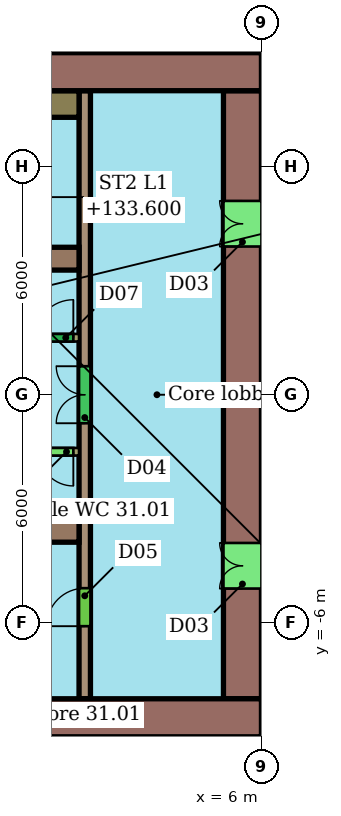
"""IFC4 building model, lengths in metres.
Left out: names, types, materials, properties, quantities, classifications, styles, units other than length and angle.
Written with IfcOpenShell. Run it as: python <this file> out.ifc"""

import sys

from ifc_helpers import new_model, si_unit, direction, frame, frame_2d, origin, place, context, subcontext, project, spatial, rectangle, extrude, element, fill, save


model = new_model("IFC4")
c1 = context("Model", 3, precision=1e-05, world=origin(), true_north=direction((0.0, 1.0)))
c2 = subcontext(c1, "Body", "Model", "MODEL_VIEW")
j1 = project(units=[si_unit("LENGTHUNIT", "METRE"), si_unit("PLANEANGLEUNIT", "RADIAN")], contexts=[c1])
p1 = place(None, origin())
s1 = spatial("IfcSite", under=j1, at=p1, CompositionType="ELEMENT")
p2 = place(p1, origin())
s2 = spatial("IfcBuilding", under=s1, at=p2, CompositionType="ELEMENT")
p3 = place(p2, frame((0.0, 0.0, 131.8)))
s3 = spatial("IfcBuildingStorey", under=s2, at=p3, CompositionType="ELEMENT", Elevation=131.8)
p4 = place(p3, frame((6.0, 8.5, 0.0), z_axis=(0.0, 0.0, 1.0), x_axis=(-1.0, 0.0, 0.0)))
e1 = element("IfcWall", 1, at=p4, inside=s3, PredefinedType="SHEAR", context=c2, shape_type="SweptSolid", body=[
    extrude(rectangle(XDim=12.0, YDim=1.0, at=frame_2d((6.0, 0.0))), origin(), (0.0, 0.0, 1.0), 3.3),
])
p5 = place(p4, frame((5.6, 0.0, 0.0)))
e2 = element("IfcOpeningElement", 2, at=p5, cuts=e1, PredefinedType="OPENING", context=c2, shape_type="SweptSolid", body=[
    extrude(rectangle(XDim=1.2, YDim=2.1, at=frame_2d((0.6, 1.05))), frame((0.0, 0.51, 0.0), z_axis=(0.0, -1.0, 0.0), x_axis=(1.0, 0.0, 0.0)), (0.0, 0.0, 1.0), 1.02),
])
p6 = place(p3, frame((-18.0, -8.5, 0.0), z_axis=(0.0, 0.0, 1.0), x_axis=(1.0, 0.0, 0.0)))
e3 = element("IfcWall", 3, at=p6, inside=s3, PredefinedType="SHEAR", context=c2, shape_type="SweptSolid", body=[
    extrude(rectangle(XDim=24.0, YDim=1.0, at=frame_2d((12.0, 0.0))), origin(), (0.0, 0.0, 1.0), 3.3),
])
p7 = place(p6, frame((6.0, 0.0, 0.0)))
e4 = element("IfcOpeningElement", 4, at=p7, cuts=e3, PredefinedType="OPENING", context=c2, shape_type="SweptSolid", body=[
    extrude(rectangle(XDim=1.2, YDim=2.1, at=frame_2d((0.6, 1.05))), frame((0.0, 0.51, 0.0), z_axis=(0.0, -1.0, 0.0), x_axis=(1.0, 0.0, 0.0)), (0.0, 0.0, 1.0), 1.02),
])
p8 = place(p3, frame((5.5, -8.0, 0.0), z_axis=(0.0, 0.0, 1.0), x_axis=(0.0, 1.0, 0.0)))
e5 = element("IfcWall", 5, at=p8, inside=s3, PredefinedType="SHEAR", context=c2, shape_type="SweptSolid", body=[
    extrude(rectangle(XDim=16.0, YDim=1.0, at=frame_2d((8.0, 0.0))), origin(), (0.0, 0.0, 1.0), 3.3),
])
p9 = place(p8, frame((2.9, 0.0, 0.0)))
e6 = element("IfcOpeningElement", 6, at=p9, cuts=e5, PredefinedType="OPENING", context=c2, shape_type="SweptSolid", body=[
    extrude(rectangle(XDim=1.2, YDim=2.1, at=frame_2d((0.6, 1.05))), frame((0.0, 0.51, 0.0), z_axis=(0.0, -1.0, 0.0), x_axis=(1.0, 0.0, 0.0)), (0.0, 0.0, 1.0), 1.02),
])
p10 = place(p8, frame((11.9, 0.0, 0.0)))
e7 = element("IfcOpeningElement", 7, at=p10, cuts=e5, PredefinedType="OPENING", context=c2, shape_type="SweptSolid", body=[
    extrude(rectangle(XDim=1.2, YDim=2.1, at=frame_2d((0.6, 1.05))), frame((0.0, 0.51, 0.0), z_axis=(0.0, -1.0, 0.0), x_axis=(1.0, 0.0, 0.0)), (0.0, 0.0, 1.0), 1.02),
])
for number, where, z_axis, x_axis in (
    (8, (-6.0, 3.58, 0.0), (0.0, 0.0, 1.0), (1.0, 0.0, 0.0)),
    (9, (-6.0, -3.58, 0.0), (0.0, 0.0, 1.0), (1.0, 0.0, 0.0)),
):
    element("IfcWall", number, at=place(p3, frame(where, z_axis=z_axis, x_axis=x_axis)), inside=s3, PredefinedType="SHEAR", context=c2, shape_type="SweptSolid", body=[
        extrude(rectangle(XDim=7.2, YDim=0.6, at=frame_2d((3.6, 0.0))), origin(), (0.0, 0.0, 1.0), 3.3),
    ])
p11 = place(p3, frame((1.35, -8.0, 0.0), z_axis=(0.0, 0.0, 1.0), x_axis=(0.0, 1.0, 0.0)))
e10 = element("IfcWall", 10, at=p11, inside=s3, PredefinedType="SHEAR", context=c2, shape_type="SweptSolid", body=[
    extrude(rectangle(XDim=16.0, YDim=0.3, at=frame_2d((8.0, 0.0))), origin(), (0.0, 0.0, 1.0), 3.3),
])
p12 = place(p11, frame((1.91, 0.0, 0.0)))
e11 = element("IfcOpeningElement", 11, at=p12, cuts=e10, PredefinedType="OPENING", context=c2, shape_type="SweptSolid", body=[
    extrude(rectangle(XDim=1.0, YDim=2.1, at=frame_2d((0.5, 1.05))), frame((0.0, 0.16, 0.0), z_axis=(0.0, -1.0, 0.0), x_axis=(1.0, 0.0, 0.0)), (0.0, 0.0, 1.0), 0.32),
])
p13 = place(p11, frame((7.25, 0.0, 0.0)))
e12 = element("IfcOpeningElement", 12, at=p13, cuts=e10, PredefinedType="OPENING", context=c2, shape_type="SweptSolid", body=[
    extrude(rectangle(XDim=1.5, YDim=2.1, at=frame_2d((0.75, 1.05))), frame((0.0, 0.16, 0.0), z_axis=(0.0, -1.0, 0.0), x_axis=(1.0, 0.0, 0.0)), (0.0, 0.0, 1.0), 0.32),
])
p14 = place(p3, frame((-13.2, 1.5, 0.0), z_axis=(0.0, 0.0, 1.0), x_axis=(1.0, 0.0, 0.0)))
e13 = element("IfcWall", 13, at=p14, inside=s3, PredefinedType="SHEAR", context=c2, shape_type="SweptSolid", body=[
    extrude(rectangle(XDim=14.4, YDim=0.2, at=frame_2d((7.2, 0.0))), origin(), (0.0, 0.0, 1.0), 3.3),
])
p15 = place(p14, frame((0.546, 0.0, 0.0)))
e14 = element("IfcOpeningElement", 14, at=p15, cuts=e13, PredefinedType="OPENING", context=c2, shape_type="SweptSolid", body=[
    extrude(rectangle(XDim=1.1, YDim=2.1, at=frame_2d((0.55, 1.05))), frame((0.0, 0.11, 0.0), z_axis=(0.0, -1.0, 0.0), x_axis=(1.0, 0.0, 0.0)), (0.0, 0.0, 1.0), 0.22),
])
p16 = place(p14, frame((2.988, 0.0, 0.0)))
e15 = element("IfcOpeningElement", 15, at=p16, cuts=e13, PredefinedType="OPENING", context=c2, shape_type="SweptSolid", body=[
    extrude(rectangle(XDim=1.1, YDim=2.1, at=frame_2d((0.55, 1.05))), frame((0.0, 0.11, 0.0), z_axis=(0.0, -1.0, 0.0), x_axis=(1.0, 0.0, 0.0)), (0.0, 0.0, 1.0), 0.22),
])
p17 = place(p14, frame((5.429, 0.0, 0.0)))
e16 = element("IfcOpeningElement", 16, at=p17, cuts=e13, PredefinedType="OPENING", context=c2, shape_type="SweptSolid", body=[
    extrude(rectangle(XDim=1.1, YDim=2.1, at=frame_2d((0.55, 1.05))), frame((0.0, 0.11, 0.0), z_axis=(0.0, -1.0, 0.0), x_axis=(1.0, 0.0, 0.0)), (0.0, 0.0, 1.0), 0.22),
])
p18 = place(p14, frame((7.871, 0.0, 0.0)))
e17 = element("IfcOpeningElement", 17, at=p18, cuts=e13, PredefinedType="OPENING", context=c2, shape_type="SweptSolid", body=[
    extrude(rectangle(XDim=1.1, YDim=2.1, at=frame_2d((0.55, 1.05))), frame((0.0, 0.11, 0.0), z_axis=(0.0, -1.0, 0.0), x_axis=(1.0, 0.0, 0.0)), (0.0, 0.0, 1.0), 0.22),
])
p19 = place(p14, frame((11.607, 0.0, 0.0)))
e18 = element("IfcOpeningElement", 18, at=p19, cuts=e13, PredefinedType="OPENING", context=c2, shape_type="SweptSolid", body=[
    extrude(rectangle(XDim=0.9, YDim=2.1, at=frame_2d((0.45, 1.05))), frame((0.0, 0.11, 0.0), z_axis=(0.0, -1.0, 0.0), x_axis=(1.0, 0.0, 0.0)), (0.0, 0.0, 1.0), 0.22),
])
p20 = place(p14, frame((13.25, 0.0, 0.0)))
e19 = element("IfcOpeningElement", 19, at=p20, cuts=e13, PredefinedType="OPENING", context=c2, shape_type="SweptSolid", body=[
    extrude(rectangle(XDim=1.0, YDim=2.1, at=frame_2d((0.5, 1.05))), frame((0.0, 0.11, 0.0), z_axis=(0.0, -1.0, 0.0), x_axis=(1.0, 0.0, 0.0)), (0.0, 0.0, 1.0), 0.22),
])
p21 = place(p3, frame((1.2, -1.5, 0.0), z_axis=(0.0, 0.0, 1.0), x_axis=(-1.0, 0.0, 0.0)))
e20 = element("IfcWall", 20, at=p21, inside=s3, PredefinedType="SHEAR", context=c2, shape_type="SweptSolid", body=[
    extrude(rectangle(XDim=14.4, YDim=0.2, at=frame_2d((7.2, 0.0))), origin(), (0.0, 0.0, 1.0), 3.3),
])
p22 = place(p21, frame((7.821, 0.0, 0.0)))
e21 = element("IfcOpeningElement", 21, at=p22, cuts=e20, PredefinedType="OPENING", context=c2, shape_type="SweptSolid", body=[
    extrude(rectangle(XDim=1.2, YDim=2.1, at=frame_2d((0.6, 1.05))), frame((0.0, 0.11, 0.0), z_axis=(0.0, -1.0, 0.0), x_axis=(1.0, 0.0, 0.0)), (0.0, 0.0, 1.0), 0.22),
])
p23 = place(p21, frame((0.15, 0.0, 0.0)))
e22 = element("IfcOpeningElement", 22, at=p23, cuts=e20, PredefinedType="OPENING", context=c2, shape_type="SweptSolid", body=[
    extrude(rectangle(XDim=0.9, YDim=2.1, at=frame_2d((0.45, 1.05))), frame((0.0, 0.11, 0.0), z_axis=(0.0, -1.0, 0.0), x_axis=(1.0, 0.0, 0.0)), (0.0, 0.0, 1.0), 0.22),
])
p24 = place(p3, frame((0.4, 7.65, 0.0), z_axis=(0.0, 0.0, 1.0), x_axis=(1.0, 0.0, 0.0)))
e23 = element("IfcWall", 23, at=p24, inside=s3, PredefinedType="SHEAR", context=c2, shape_type="SweptSolid", body=[
    extrude(rectangle(XDim=0.8, YDim=0.7, at=frame_2d((0.4, 0.0))), origin(), (0.0, 0.0, 1.0), 3.3),
])
p25 = place(p9, origin())
e24 = element("IfcDoor", 24, at=p25, inside=s3, OperationType="DOUBLE_DOOR_SINGLE_SWING", PredefinedType="NOTDEFINED", context=c2, shape_type="SweptSolid", body=[
    extrude(rectangle(XDim=1.2, YDim=2.1, at=frame_2d((0.6, 1.05))), frame((0.0, 0.025, 0.0), z_axis=(0.0, -1.0, 0.0), x_axis=(1.0, 0.0, 0.0)), (0.0, 0.0, 1.0), 0.05),
])
fill(e6, e24)
p26 = place(p10, origin())
e25 = element("IfcDoor", 25, at=p26, inside=s3, OperationType="DOUBLE_DOOR_SINGLE_SWING", PredefinedType="NOTDEFINED", context=c2, shape_type="SweptSolid", body=[
    extrude(rectangle(XDim=1.2, YDim=2.1, at=frame_2d((0.6, 1.05))), frame((0.0, 0.025, 0.0), z_axis=(0.0, -1.0, 0.0), x_axis=(1.0, 0.0, 0.0)), (0.0, 0.0, 1.0), 0.05),
])
fill(e7, e25)
p27 = place(p12, origin())
e26 = element("IfcDoor", 26, at=p27, inside=s3, OperationType="SINGLE_SWING_LEFT", PredefinedType="NOTDEFINED", context=c2, shape_type="SweptSolid", body=[
    extrude(rectangle(XDim=1.0, YDim=2.1, at=frame_2d((0.5, 1.05))), frame((0.0, 0.025, 0.0), z_axis=(0.0, -1.0, 0.0), x_axis=(1.0, 0.0, 0.0)), (0.0, 0.0, 1.0), 0.05),
])
fill(e11, e26)
p28 = place(p13, origin())
e27 = element("IfcDoor", 27, at=p28, inside=s3, OperationType="DOUBLE_DOOR_SINGLE_SWING", PredefinedType="NOTDEFINED", context=c2, shape_type="SweptSolid", body=[
    extrude(rectangle(XDim=1.5, YDim=2.1, at=frame_2d((0.75, 1.05))), frame((0.0, 0.025, 0.0), z_axis=(0.0, -1.0, 0.0), x_axis=(1.0, 0.0, 0.0)), (0.0, 0.0, 1.0), 0.05),
])
fill(e12, e27)
p29 = place(p20, origin())
e28 = element("IfcDoor", 28, at=p29, inside=s3, OperationType="SINGLE_SWING_RIGHT", PredefinedType="NOTDEFINED", context=c2, shape_type="SweptSolid", body=[
    extrude(rectangle(XDim=1.0, YDim=2.1, at=frame_2d((0.5, 1.05))), frame((0.0, 0.025, 0.0), z_axis=(0.0, -1.0, 0.0), x_axis=(1.0, 0.0, 0.0)), (0.0, 0.0, 1.0), 0.05),
])
fill(e19, e28)
p30 = place(p23, origin())
e29 = element("IfcDoor", 29, at=p30, inside=s3, OperationType="SINGLE_SWING_LEFT", PredefinedType="NOTDEFINED", context=c2, shape_type="SweptSolid", body=[
    extrude(rectangle(XDim=0.9, YDim=2.1, at=frame_2d((0.45, 1.05))), frame((0.0, 0.025, 0.0), z_axis=(0.0, -1.0, 0.0), x_axis=(1.0, 0.0, 0.0)), (0.0, 0.0, 1.0), 0.05),
])
fill(e22, e29)
save(model, sys.argv[1])
